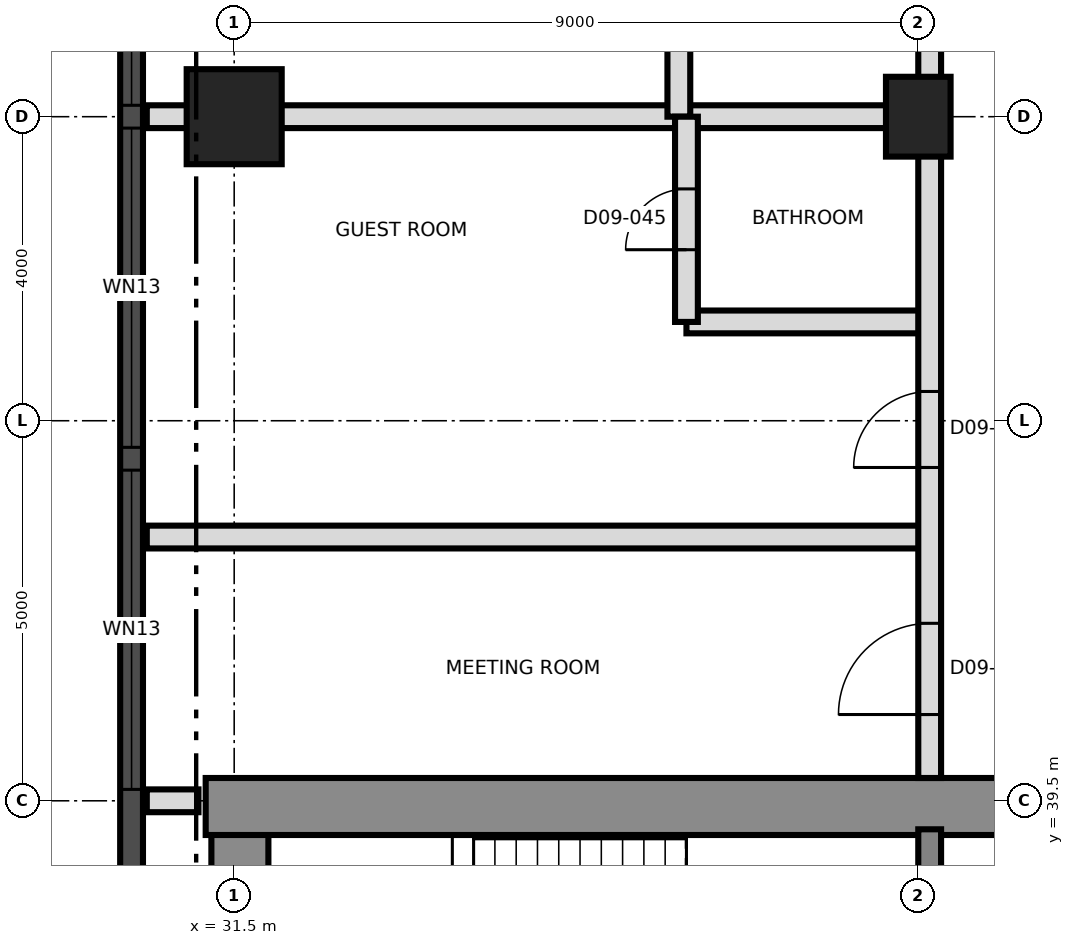
"""IFC4 building model, lengths in metres.
Left out: names, types, materials, properties, quantities, classifications, styles, units other than length and angle.
Written with IfcOpenShell. Run it as: python <this file> out.ifc"""

import sys

from ifc_helpers import new_model, si_unit, direction, frame, frame_2d, origin, origin_2d, place, context, subcontext, project, spatial, rectangle, extrude, element, fill, save


model = new_model("IFC4")
c1 = context("Model", 3, precision=1e-05, world=origin(), true_north=direction((0.0, 1.0)))
c2 = subcontext(c1, "Body", "Model", "MODEL_VIEW")
j1 = project(units=[si_unit("LENGTHUNIT", "METRE"), si_unit("PLANEANGLEUNIT", "RADIAN")], contexts=[c1])
p1 = place(None, origin())
s1 = spatial("IfcSite", under=j1, at=p1, CompositionType="ELEMENT")
p2 = place(p1, origin())
s2 = spatial("IfcBuilding", under=s1, at=p2, CompositionType="ELEMENT")
p3 = place(p2, frame((0.0, 0.0, 105.6)))
s3 = spatial("IfcBuildingStorey", under=s2, at=p3, CompositionType="ELEMENT", Elevation=105.6)
p4 = place(p3, frame((31.575, 21.875, 0.0), z_axis=(0.0, 0.0, 1.0), x_axis=(0.0, 1.0, 0.0)))
e1 = element("IfcWall", 1, at=p4, inside=s3, PredefinedType="SHEAR", context=c2, shape_type="SweptSolid", body=[
    extrude(rectangle(XDim=17.25, YDim=0.75, at=frame_2d((8.625, 0.0))), origin(), (0.0, 0.0, 1.0), 3.7),
])
p5 = place(p3, frame((31.125, 39.425, 0.0), z_axis=(0.0, 0.0, 1.0), x_axis=(1.0, 0.0, 0.0)))
e2 = element("IfcWall", 2, at=p5, inside=s3, PredefinedType="SHEAR", context=c2, shape_type="SweptSolid", body=[
    extrude(rectangle(XDim=27.0, YDim=0.75, at=frame_2d((13.5, 0.0))), origin(), (0.0, 0.0, 1.0), 3.7),
])
p6 = place(p5, frame((10.575, 0.0, 0.0)))
e3 = element("IfcOpeningElement", 3, at=p6, cuts=e2, PredefinedType="OPENING", context=c2, shape_type="SweptSolid", body=[
    extrude(rectangle(XDim=1.2, YDim=2.1, at=frame_2d((0.6, 1.05))), frame((0.0, 0.385, 0.0), z_axis=(0.0, -1.0, 0.0), x_axis=(1.0, 0.0, 0.0)), (0.0, 0.0, 1.0), 0.77),
])
p7 = place(p3, frame((40.65, 33.5, 0.0), z_axis=(0.0, 0.0, 1.0), x_axis=(0.0, 1.0, 0.0)))
e4 = element("IfcWall", 4, at=p7, inside=s3, PredefinedType="SHEAR", context=c2, shape_type="SweptSolid", body=[
    extrude(rectangle(XDim=5.625, YDim=0.3, at=frame_2d((2.812, 0.0))), origin(), (0.0, 0.0, 1.0), 3.7),
])
p8 = place(p3, frame((31.5, 48.5, 0.0), z_axis=(0.0, 0.0, 1.0), x_axis=(1.0, 0.0, 0.0)))
e5 = element("IfcColumn", 5, at=p8, inside=s3, PredefinedType="COLUMN", context=c2, shape_type="SweptSolid", body=[
    extrude(rectangle(XDim=1.25, YDim=1.25, at=origin_2d()), origin(), (0.0, 0.0, 1.0), 3.7),
])
p9 = place(p3, frame((40.5, 48.5, 0.0), z_axis=(0.0, 0.0, 1.0), x_axis=(0.0, 1.0, 0.0)))
e6 = element("IfcColumn", 6, at=p9, inside=s3, PredefinedType="COLUMN", context=c2, shape_type="SweptSolid", body=[
    extrude(rectangle(XDim=1.05, YDim=0.85, at=origin_2d()), origin(), (0.0, 0.0, 1.0), 3.7),
])
p10 = place(p3, frame((30.15, 66.992, 0.0), z_axis=(0.0, 0.0, 1.0), x_axis=(0.0, -1.0, 0.0)))
e7 = element("IfcWall", 7, at=p10, inside=s3, PredefinedType="SOLIDWALL", context=c2, shape_type="SweptSolid", body=[
    extrude(rectangle(XDim=32.968, YDim=0.3, at=frame_2d((16.484, 0.0))), origin(), (0.0, 0.0, 1.0), 3.4),
])
p11 = place(p10, frame((1.596, 0.0, 0.3)))
e8 = element("IfcOpeningElement", 8, at=p11, cuts=e7, PredefinedType="OPENING", context=c2, shape_type="SweptSolid", body=[
    extrude(rectangle(XDim=1.8, YDim=2.4, at=frame_2d((0.9, 1.2))), frame((0.0, 0.16, 0.0), z_axis=(0.0, -1.0, 0.0), x_axis=(1.0, 0.0, 0.0)), (0.0, 0.0, 1.0), 0.32),
])
p12 = place(p10, frame((5.142, 0.0, 0.9)))
e9 = element("IfcOpeningElement", 9, at=p12, cuts=e7, PredefinedType="OPENING", context=c2, shape_type="SweptSolid", body=[
    extrude(rectangle(XDim=4.2, YDim=1.7, at=frame_2d((2.1, 0.85))), frame((0.0, 0.16, 0.0), z_axis=(0.0, -1.0, 0.0), x_axis=(1.0, 0.0, 0.0)), (0.0, 0.0, 1.0), 0.32),
])
p13 = place(p10, frame((9.642, 0.0, 0.9)))
e10 = element("IfcOpeningElement", 10, at=p13, cuts=e7, PredefinedType="OPENING", context=c2, shape_type="SweptSolid", body=[
    extrude(rectangle(XDim=4.2, YDim=1.7, at=frame_2d((2.1, 0.85))), frame((0.0, 0.16, 0.0), z_axis=(0.0, -1.0, 0.0), x_axis=(1.0, 0.0, 0.0)), (0.0, 0.0, 1.0), 0.32),
])
p14 = place(p10, frame((14.142, 0.0, 0.9)))
e11 = element("IfcOpeningElement", 11, at=p14, cuts=e7, PredefinedType="OPENING", context=c2, shape_type="SweptSolid", body=[
    extrude(rectangle(XDim=4.2, YDim=1.7, at=frame_2d((2.1, 0.85))), frame((0.0, 0.16, 0.0), z_axis=(0.0, -1.0, 0.0), x_axis=(1.0, 0.0, 0.0)), (0.0, 0.0, 1.0), 0.32),
])
p15 = place(p10, frame((18.642, 0.0, 0.9)))
e12 = element("IfcOpeningElement", 12, at=p15, cuts=e7, PredefinedType="OPENING", context=c2, shape_type="SweptSolid", body=[
    extrude(rectangle(XDim=4.2, YDim=1.7, at=frame_2d((2.1, 0.85))), frame((0.0, 0.16, 0.0), z_axis=(0.0, -1.0, 0.0), x_axis=(1.0, 0.0, 0.0)), (0.0, 0.0, 1.0), 0.32),
])
p16 = place(p10, frame((23.142, 0.0, 0.9)))
e13 = element("IfcOpeningElement", 13, at=p16, cuts=e7, PredefinedType="OPENING", context=c2, shape_type="SweptSolid", body=[
    extrude(rectangle(XDim=4.2, YDim=1.7, at=frame_2d((2.1, 0.85))), frame((0.0, 0.16, 0.0), z_axis=(0.0, -1.0, 0.0), x_axis=(1.0, 0.0, 0.0)), (0.0, 0.0, 1.0), 0.32),
])
p17 = place(p10, frame((29.33, 0.0, 0.3)))
e14 = element("IfcOpeningElement", 14, at=p17, cuts=e7, PredefinedType="OPENING", context=c2, shape_type="SweptSolid", body=[
    extrude(rectangle(XDim=1.8, YDim=2.4, at=frame_2d((0.9, 1.2))), frame((0.0, 0.16, 0.0), z_axis=(0.0, -1.0, 0.0), x_axis=(1.0, 0.0, 0.0)), (0.0, 0.0, 1.0), 0.32),
])
p18 = place(p3, frame((30.35, 39.5, 0.0), z_axis=(0.0, 0.0, 1.0), x_axis=(1.0, 0.0, 0.0)))
e15 = element("IfcWall", 15, at=p18, inside=s3, PredefinedType="PARTITIONING", context=c2, shape_type="SweptSolid", body=[
    extrude(rectangle(XDim=0.68, YDim=0.3, at=frame_2d((0.34, 0.0))), origin(), (0.0, 0.0, 1.0), 3.4),
])
p19 = place(p3, frame((30.35, 42.97, 0.0), z_axis=(0.0, 0.0, 1.0), x_axis=(1.0, 0.0, 0.0)))
e16 = element("IfcWall", 16, at=p19, inside=s3, PredefinedType="PARTITIONING", context=c2, shape_type="SweptSolid", body=[
    extrude(rectangle(XDim=10.3, YDim=0.3, at=frame_2d((5.15, 0.0))), origin(), (0.0, 0.0, 1.0), 3.4),
])
p20 = place(p3, frame((37.45, 45.8, 0.0), z_axis=(0.0, 0.0, 1.0), x_axis=(1.0, 0.0, 0.0)))
e17 = element("IfcWall", 17, at=p20, inside=s3, PredefinedType="PARTITIONING", context=c2, shape_type="SweptSolid", body=[
    extrude(rectangle(XDim=3.2, YDim=0.3, at=frame_2d((1.6, 0.0))), origin(), (0.0, 0.0, 1.0), 3.4),
])
p21 = place(p3, frame((30.35, 48.5, 0.0), z_axis=(0.0, 0.0, 1.0), x_axis=(1.0, 0.0, 0.0)))
e18 = element("IfcWall", 18, at=p21, inside=s3, PredefinedType="PARTITIONING", context=c2, shape_type="SweptSolid", body=[
    extrude(rectangle(XDim=10.3, YDim=0.3, at=frame_2d((5.15, 0.0))), origin(), (0.0, 0.0, 1.0), 3.4),
])
p22 = place(p3, frame((37.35, 48.5, 0.0), z_axis=(0.0, 0.0, 1.0), x_axis=(0.0, 1.0, 0.0)))
e19 = element("IfcWall", 19, at=p22, inside=s3, PredefinedType="PARTITIONING", context=c2, shape_type="SweptSolid", body=[
    extrude(rectangle(XDim=2.7, YDim=0.3, at=frame_2d((1.35, 0.0))), origin(), (0.0, 0.0, 1.0), 3.4),
])
p23 = place(p22, frame((0.95, 0.0, 0.0)))
e20 = element("IfcOpeningElement", 20, at=p23, cuts=e19, PredefinedType="OPENING", context=c2, shape_type="SweptSolid", body=[
    extrude(rectangle(XDim=0.8, YDim=2.1, at=frame_2d((0.4, 1.05))), frame((0.0, 0.16, 0.0), z_axis=(0.0, -1.0, 0.0), x_axis=(1.0, 0.0, 0.0)), (0.0, 0.0, 1.0), 0.32),
])
p24 = place(p3, frame((37.45, 45.8, 0.0), z_axis=(0.0, 0.0, 1.0), x_axis=(0.0, 1.0, 0.0)))
e21 = element("IfcWall", 21, at=p24, inside=s3, PredefinedType="PARTITIONING", context=c2, shape_type="SweptSolid", body=[
    extrude(rectangle(XDim=2.7, YDim=0.3, at=frame_2d((1.35, 0.0))), origin(), (0.0, 0.0, 1.0), 3.4),
])
p25 = place(p24, frame((0.95, 0.0, 0.0)))
e22 = element("IfcOpeningElement", 22, at=p25, cuts=e21, PredefinedType="OPENING", context=c2, shape_type="SweptSolid", body=[
    extrude(rectangle(XDim=0.8, YDim=2.1, at=frame_2d((0.4, 1.05))), frame((0.0, 0.16, 0.0), z_axis=(0.0, -1.0, 0.0), x_axis=(1.0, 0.0, 0.0)), (0.0, 0.0, 1.0), 0.32),
])
p26 = place(p3, frame((40.65, 39.8, 0.0), z_axis=(0.0, 0.0, 1.0), x_axis=(0.0, 1.0, 0.0)))
e23 = element("IfcWall", 23, at=p26, inside=s3, PredefinedType="PARTITIONING", context=c2, shape_type="SweptSolid", body=[
    extrude(rectangle(XDim=37.09, YDim=0.3, at=frame_2d((18.545, 0.0))), origin(), (0.0, 0.0, 1.0), 3.4),
])
p27 = place(p26, frame((0.835, 0.0, 0.0)))
e24 = element("IfcOpeningElement", 24, at=p27, cuts=e23, PredefinedType="OPENING", context=c2, shape_type="SweptSolid", body=[
    extrude(rectangle(XDim=1.2, YDim=2.1, at=frame_2d((0.6, 1.05))), frame((0.0, 0.16, 0.0), z_axis=(0.0, -1.0, 0.0), x_axis=(1.0, 0.0, 0.0)), (0.0, 0.0, 1.0), 0.32),
])
p28 = place(p26, frame((4.085, 0.0, 0.0)))
e25 = element("IfcOpeningElement", 25, at=p28, cuts=e23, PredefinedType="OPENING", context=c2, shape_type="SweptSolid", body=[
    extrude(rectangle(XDim=1.0, YDim=2.1, at=frame_2d((0.5, 1.05))), frame((0.0, 0.16, 0.0), z_axis=(0.0, -1.0, 0.0), x_axis=(1.0, 0.0, 0.0)), (0.0, 0.0, 1.0), 0.32),
])
p29 = place(p26, frame((11.62, 0.0, 0.0)))
e26 = element("IfcOpeningElement", 26, at=p29, cuts=e23, PredefinedType="OPENING", context=c2, shape_type="SweptSolid", body=[
    extrude(rectangle(XDim=1.0, YDim=2.4, at=frame_2d((0.5, 1.2))), frame((0.0, 0.16, 0.0), z_axis=(0.0, -1.0, 0.0), x_axis=(1.0, 0.0, 0.0)), (0.0, 0.0, 1.0), 0.32),
])
p30 = place(p26, frame((13.27, 0.0, 0.0)))
e27 = element("IfcOpeningElement", 27, at=p30, cuts=e23, PredefinedType="OPENING", context=c2, shape_type="SweptSolid", body=[
    extrude(rectangle(XDim=1.0, YDim=2.4, at=frame_2d((0.5, 1.2))), frame((0.0, 0.16, 0.0), z_axis=(0.0, -1.0, 0.0), x_axis=(1.0, 0.0, 0.0)), (0.0, 0.0, 1.0), 0.32),
])
p31 = place(p26, frame((21.2, 0.0, 0.0)))
e28 = element("IfcOpeningElement", 28, at=p31, cuts=e23, PredefinedType="OPENING", context=c2, shape_type="SweptSolid", body=[
    extrude(rectangle(XDim=1.0, YDim=2.4, at=frame_2d((0.5, 1.2))), frame((0.0, 0.16, 0.0), z_axis=(0.0, -1.0, 0.0), x_axis=(1.0, 0.0, 0.0)), (0.0, 0.0, 1.0), 0.32),
])
p32 = place(p14, origin())
e29 = element("IfcWindow", 29, at=p32, inside=s3, PartitioningType="SINGLE_PANEL", PredefinedType="WINDOW", context=c2, shape_type="SweptSolid", body=[
    extrude(rectangle(XDim=4.2, YDim=1.7, at=frame_2d((2.1, 0.85))), frame((0.0, 0.03, 0.0), z_axis=(0.0, -1.0, 0.0), x_axis=(1.0, 0.0, 0.0)), (0.0, 0.0, 1.0), 0.06),
])
fill(e11, e29)
p33 = place(p15, origin())
e30 = element("IfcWindow", 30, at=p33, inside=s3, PartitioningType="SINGLE_PANEL", PredefinedType="WINDOW", context=c2, shape_type="SweptSolid", body=[
    extrude(rectangle(XDim=4.2, YDim=1.7, at=frame_2d((2.1, 0.85))), frame((0.0, 0.03, 0.0), z_axis=(0.0, -1.0, 0.0), x_axis=(1.0, 0.0, 0.0)), (0.0, 0.0, 1.0), 0.06),
])
fill(e12, e30)
p34 = place(p16, origin())
e31 = element("IfcWindow", 31, at=p34, inside=s3, PartitioningType="SINGLE_PANEL", PredefinedType="WINDOW", context=c2, shape_type="SweptSolid", body=[
    extrude(rectangle(XDim=4.2, YDim=1.7, at=frame_2d((2.1, 0.85))), frame((0.0, 0.03, 0.0), z_axis=(0.0, -1.0, 0.0), x_axis=(1.0, 0.0, 0.0)), (0.0, 0.0, 1.0), 0.06),
])
fill(e13, e31)
p35 = place(p27, origin())
e32 = element("IfcDoor", 32, at=p35, inside=s3, OperationType="SINGLE_SWING_RIGHT", PredefinedType="DOOR", context=c2, shape_type="SweptSolid", body=[
    extrude(rectangle(XDim=1.2, YDim=2.1, at=frame_2d((0.6, 1.05))), frame((0.0, 0.025, 0.0), z_axis=(0.0, -1.0, 0.0), x_axis=(1.0, 0.0, 0.0)), (0.0, 0.0, 1.0), 0.05),
])
fill(e24, e32)
p36 = place(p25, origin())
e33 = element("IfcDoor", 33, at=p36, inside=s3, OperationType="SINGLE_SWING_LEFT", PredefinedType="DOOR", context=c2, shape_type="SweptSolid", body=[
    extrude(rectangle(XDim=0.8, YDim=2.1, at=frame_2d((0.4, 1.05))), frame((0.0, 0.025, 0.0), z_axis=(0.0, -1.0, 0.0), x_axis=(1.0, 0.0, 0.0)), (0.0, 0.0, 1.0), 0.05),
])
fill(e22, e33)
p37 = place(p28, origin())
e34 = element("IfcDoor", 34, at=p37, inside=s3, OperationType="SINGLE_SWING_LEFT", PredefinedType="DOOR", context=c2, shape_type="SweptSolid", body=[
    extrude(rectangle(XDim=1.0, YDim=2.1, at=frame_2d((0.5, 1.05))), frame((0.0, 0.025, 0.0), z_axis=(0.0, -1.0, 0.0), x_axis=(1.0, 0.0, 0.0)), (0.0, 0.0, 1.0), 0.05),
])
fill(e25, e34)
save(model, sys.argv[1])
